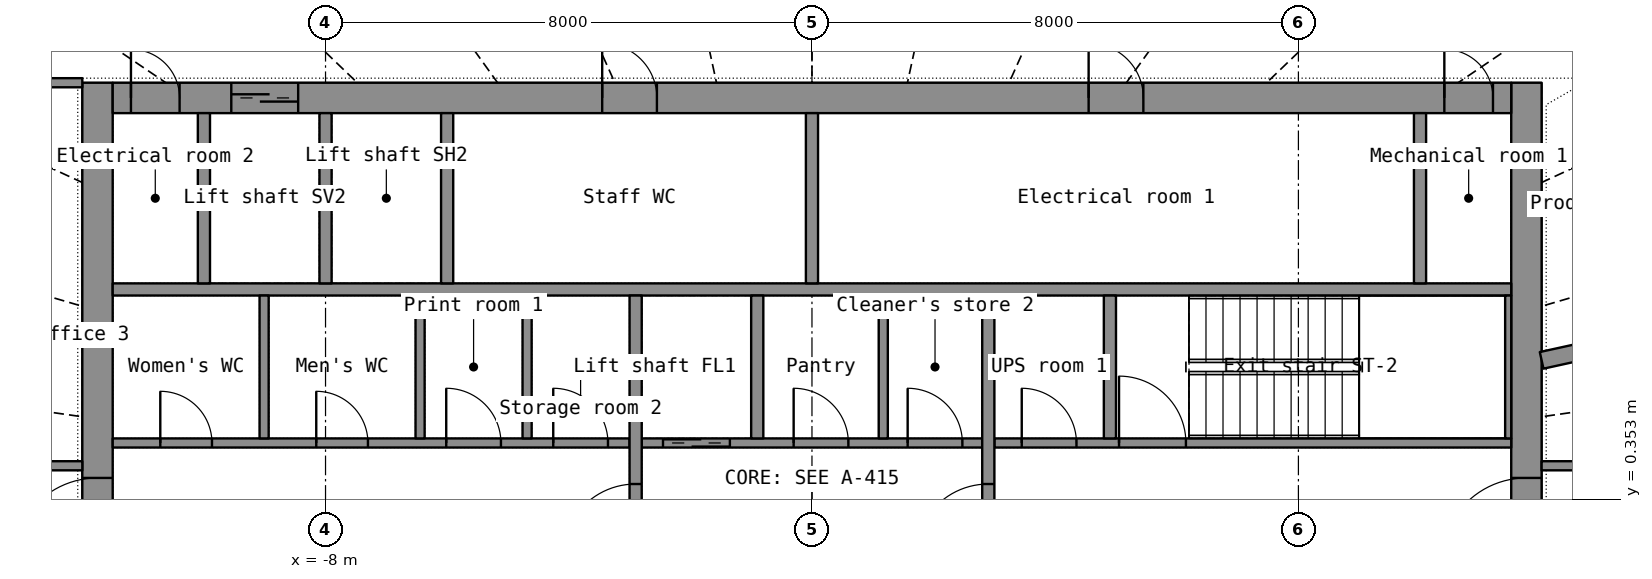
"""IFC4 building model, lengths in metres.
Left out: names, types, materials, properties, quantities, classifications, styles, units other than length and angle.
Written with IfcOpenShell. Run it as: python <this file> out.ifc"""

import sys

from ifc_helpers import new_model, si_unit, direction, frame, frame_2d, origin, place, context, subcontext, project, spatial, rectangle, extrude, element, fill, save


model = new_model("IFC4")
c1 = context("Model", 3, precision=1e-05, world=origin(), true_north=direction((0.0, 1.0)))
c2 = subcontext(c1, "Body", "Model", "MODEL_VIEW")
j1 = project(units=[si_unit("LENGTHUNIT", "METRE"), si_unit("PLANEANGLEUNIT", "RADIAN")], contexts=[c1])
p1 = place(None, origin())
s1 = spatial("IfcSite", under=j1, at=p1, CompositionType="ELEMENT")
p2 = place(p1, origin())
s2 = spatial("IfcBuilding", under=s1, at=p2, CompositionType="ELEMENT")
p3 = place(p2, frame((0.0, 0.0, 104.5)))
s3 = spatial("IfcBuildingStorey", under=s2, at=p3, CompositionType="ELEMENT", Elevation=104.5)
p4 = place(p3, frame((-11.75, -7.2, 0.0), z_axis=(0.0, 0.0, 1.0), x_axis=(0.0, 1.0, 0.0)))
e1 = element("IfcWall", 1, at=p4, inside=s3, PredefinedType="SHEAR", context=c2, shape_type="SweptSolid", body=[
    extrude(rectangle(XDim=14.4, YDim=0.5, at=frame_2d((7.2, 0.0))), origin(), (0.0, 0.0, 1.0), 3.3),
])
p5 = place(p4, frame((6.5, 0.0, 0.0)))
e2 = element("IfcOpeningElement", 2, at=p5, cuts=e1, PredefinedType="OPENING", context=c2, shape_type="SweptSolid", body=[
    extrude(rectangle(XDim=1.4, YDim=2.2, at=frame_2d((0.7, 1.1))), frame((0.0, 0.26, 0.0), z_axis=(0.0, -1.0, 0.0), x_axis=(1.0, 0.0, 0.0)), (0.0, 0.0, 1.0), 0.52),
])
p6 = place(p3, frame((11.75, -7.2, 0.0), z_axis=(0.0, 0.0, 1.0), x_axis=(0.0, 1.0, 0.0)))
e3 = element("IfcWall", 3, at=p6, inside=s3, PredefinedType="SHEAR", context=c2, shape_type="SweptSolid", body=[
    extrude(rectangle(XDim=14.4, YDim=0.5, at=frame_2d((7.2, 0.0))), origin(), (0.0, 0.0, 1.0), 3.3),
])
p7 = place(p6, frame((6.5, 0.0, 0.0)))
e4 = element("IfcOpeningElement", 4, at=p7, cuts=e3, PredefinedType="OPENING", context=c2, shape_type="SweptSolid", body=[
    extrude(rectangle(XDim=1.4, YDim=2.2, at=frame_2d((0.7, 1.1))), frame((0.0, 0.26, 0.0), z_axis=(0.0, -1.0, 0.0), x_axis=(1.0, 0.0, 0.0)), (0.0, 0.0, 1.0), 0.52),
])
p8 = place(p3, frame((-11.5, 6.95, 0.0), z_axis=(0.0, 0.0, 1.0), x_axis=(1.0, 0.0, 0.0)))
e5 = element("IfcWall", 5, at=p8, inside=s3, PredefinedType="SHEAR", context=c2, shape_type="SweptSolid", body=[
    extrude(rectangle(XDim=23.0, YDim=0.5, at=frame_2d((11.5, 0.0))), origin(), (0.0, 0.0, 1.0), 3.3),
])
p9 = place(p8, frame((1.95, 0.0, 0.0)))
e6 = element("IfcOpeningElement", 6, at=p9, cuts=e5, PredefinedType="OPENING", context=c2, shape_type="SweptSolid", body=[
    extrude(rectangle(XDim=1.1, YDim=2.2, at=frame_2d((0.55, 1.1))), frame((0.0, 0.26, 0.0), z_axis=(0.0, -1.0, 0.0), x_axis=(1.0, 0.0, 0.0)), (0.0, 0.0, 1.0), 0.52),
])
p10 = place(p8, frame((8.05, 0.0, 0.0)))
e7 = element("IfcOpeningElement", 7, at=p10, cuts=e5, PredefinedType="OPENING", context=c2, shape_type="SweptSolid", body=[
    extrude(rectangle(XDim=0.9, YDim=2.1, at=frame_2d((0.45, 1.05))), frame((0.0, 0.26, 0.0), z_axis=(0.0, -1.0, 0.0), x_axis=(1.0, 0.0, 0.0)), (0.0, 0.0, 1.0), 0.52),
])
p11 = place(p8, frame((16.05, 0.0, 0.0)))
e8 = element("IfcOpeningElement", 8, at=p11, cuts=e5, PredefinedType="OPENING", context=c2, shape_type="SweptSolid", body=[
    extrude(rectangle(XDim=0.9, YDim=2.1, at=frame_2d((0.45, 1.05))), frame((0.0, 0.26, 0.0), z_axis=(0.0, -1.0, 0.0), x_axis=(1.0, 0.0, 0.0)), (0.0, 0.0, 1.0), 0.52),
])
p12 = place(p8, frame((0.3, 0.0, 0.0)))
e9 = element("IfcOpeningElement", 9, at=p12, cuts=e5, PredefinedType="OPENING", context=c2, shape_type="SweptSolid", body=[
    extrude(rectangle(XDim=0.8, YDim=2.05, at=frame_2d((0.4, 1.025))), frame((0.0, 0.26, 0.0), z_axis=(0.0, -1.0, 0.0), x_axis=(1.0, 0.0, 0.0)), (0.0, 0.0, 1.0), 0.52),
])
p13 = place(p8, frame((21.9, 0.0, 0.0)))
e10 = element("IfcOpeningElement", 10, at=p13, cuts=e5, PredefinedType="OPENING", context=c2, shape_type="SweptSolid", body=[
    extrude(rectangle(XDim=0.8, YDim=2.05, at=frame_2d((0.4, 1.025))), frame((0.0, 0.26, 0.0), z_axis=(0.0, -1.0, 0.0), x_axis=(1.0, 0.0, 0.0)), (0.0, 0.0, 1.0), 0.52),
])
p14 = place(p3, frame((-11.5, 3.8, 0.0), z_axis=(0.0, 0.0, 1.0), x_axis=(1.0, 0.0, 0.0)))
e11 = element("IfcWall", 11, at=p14, inside=s3, PredefinedType="SHEAR", context=c2, shape_type="SweptSolid", body=[
    extrude(rectangle(XDim=23.0, YDim=0.2, at=frame_2d((11.5, 0.0))), origin(), (0.0, 0.0, 1.0), 3.3),
])
for number, where, z_axis, x_axis in (
    (12, (-10.0, 3.9, 0.0), (0.0, 0.0, 1.0), (0.0, 1.0, 0.0)),
    (13, (-8.0, 3.9, 0.0), (0.0, 0.0, 1.0), (0.0, 1.0, 0.0)),
    (14, (-6.0, 3.9, 0.0), (0.0, 0.0, 1.0), (0.0, 1.0, 0.0)),
    (15, (10.0, 3.9, 0.0), (0.0, 0.0, 1.0), (0.0, 1.0, 0.0)),
):
    element("IfcWall", number, at=place(p3, frame(where, z_axis=z_axis, x_axis=x_axis)), inside=s3, PredefinedType="SHEAR", context=c2, shape_type="SweptSolid", body=[
        extrude(rectangle(XDim=2.8, YDim=0.2, at=frame_2d((1.4, 0.0))), origin(), (0.0, 0.0, 1.0), 3.3),
    ])
p15 = place(p3, frame((0.0, 3.9, 0.0), z_axis=(0.0, 0.0, 1.0), x_axis=(0.0, 1.0, 0.0)))
e16 = element("IfcWall", 16, at=p15, inside=s3, PredefinedType="PARTITIONING", context=c2, shape_type="SweptSolid", body=[
    extrude(rectangle(XDim=2.8, YDim=0.2, at=frame_2d((1.4, 0.0))), origin(), (0.0, 0.0, 1.0), 3.3),
])
p16 = place(p3, frame((-11.5, 1.275, 0.0), z_axis=(0.0, 0.0, 1.0), x_axis=(1.0, 0.0, 0.0)))
e17 = element("IfcWall", 17, at=p16, inside=s3, PredefinedType="PARTITIONING", context=c2, shape_type="SweptSolid", body=[
    extrude(rectangle(XDim=8.5, YDim=0.15, at=frame_2d((4.25, 0.0))), origin(), (0.0, 0.0, 1.0), 3.3),
])
p17 = place(p16, frame((0.782, 0.0, 0.0)))
e18 = element("IfcOpeningElement", 18, at=p17, cuts=e17, PredefinedType="OPENING", context=c2, shape_type="SweptSolid", body=[
    extrude(rectangle(XDim=0.85, YDim=2.1, at=frame_2d((0.425, 1.05))), frame((0.0, 0.085, 0.0), z_axis=(0.0, -1.0, 0.0), x_axis=(1.0, 0.0, 0.0)), (0.0, 0.0, 1.0), 0.17),
])
p18 = place(p16, frame((3.347, 0.0, 0.0)))
e19 = element("IfcOpeningElement", 19, at=p18, cuts=e17, PredefinedType="OPENING", context=c2, shape_type="SweptSolid", body=[
    extrude(rectangle(XDim=0.85, YDim=2.1, at=frame_2d((0.425, 1.05))), frame((0.0, 0.085, 0.0), z_axis=(0.0, -1.0, 0.0), x_axis=(1.0, 0.0, 0.0)), (0.0, 0.0, 1.0), 0.17),
])
p19 = place(p16, frame((5.485, 0.0, 0.0)))
e20 = element("IfcOpeningElement", 20, at=p19, cuts=e17, PredefinedType="OPENING", context=c2, shape_type="SweptSolid", body=[
    extrude(rectangle(XDim=0.9, YDim=2.1, at=frame_2d((0.45, 1.05))), frame((0.0, 0.085, 0.0), z_axis=(0.0, -1.0, 0.0), x_axis=(1.0, 0.0, 0.0)), (0.0, 0.0, 1.0), 0.17),
])
p20 = place(p16, frame((7.245, 0.0, 0.0)))
e21 = element("IfcOpeningElement", 21, at=p20, cuts=e17, PredefinedType="OPENING", context=c2, shape_type="SweptSolid", body=[
    extrude(rectangle(XDim=0.9, YDim=2.1, at=frame_2d((0.45, 1.05))), frame((0.0, 0.085, 0.0), z_axis=(0.0, -1.0, 0.0), x_axis=(1.0, 0.0, 0.0)), (0.0, 0.0, 1.0), 0.17),
])
p21 = place(p3, frame((-2.8, 1.275, 0.0), z_axis=(0.0, 0.0, 1.0), x_axis=(1.0, 0.0, 0.0)))
e22 = element("IfcWall", 22, at=p21, inside=s3, PredefinedType="SHEAR", context=c2, shape_type="SweptSolid", body=[
    extrude(rectangle(XDim=5.6, YDim=0.15, at=frame_2d((2.8, 0.0))), origin(), (0.0, 0.0, 1.0), 3.3),
])
p22 = place(p21, frame((0.35, 0.0, 0.0)))
e23 = element("IfcOpeningElement", 23, at=p22, cuts=e22, PredefinedType="OPENING", context=c2, shape_type="SweptSolid", body=[
    extrude(rectangle(XDim=1.1, YDim=2.2, at=frame_2d((0.55, 1.1))), frame((0.0, 0.085, 0.0), z_axis=(0.0, -1.0, 0.0), x_axis=(1.0, 0.0, 0.0)), (0.0, 0.0, 1.0), 0.17),
])
p23 = place(p21, frame((2.499, 0.0, 0.0)))
e24 = element("IfcOpeningElement", 24, at=p23, cuts=e22, PredefinedType="OPENING", context=c2, shape_type="SweptSolid", body=[
    extrude(rectangle(XDim=0.9, YDim=2.1, at=frame_2d((0.45, 1.05))), frame((0.0, 0.085, 0.0), z_axis=(0.0, -1.0, 0.0), x_axis=(1.0, 0.0, 0.0)), (0.0, 0.0, 1.0), 0.17),
])
p24 = place(p21, frame((4.374, 0.0, 0.0)))
e25 = element("IfcOpeningElement", 25, at=p24, cuts=e22, PredefinedType="OPENING", context=c2, shape_type="SweptSolid", body=[
    extrude(rectangle(XDim=0.9, YDim=2.1, at=frame_2d((0.45, 1.05))), frame((0.0, 0.085, 0.0), z_axis=(0.0, -1.0, 0.0), x_axis=(1.0, 0.0, 0.0)), (0.0, 0.0, 1.0), 0.17),
])
p25 = place(p3, frame((3.0, 1.275, 0.0), z_axis=(0.0, 0.0, 1.0), x_axis=(1.0, 0.0, 0.0)))
e26 = element("IfcWall", 26, at=p25, inside=s3, PredefinedType="SHEAR", context=c2, shape_type="SweptSolid", body=[
    extrude(rectangle(XDim=8.5, YDim=0.15, at=frame_2d((4.25, 0.0))), origin(), (0.0, 0.0, 1.0), 3.3),
])
p26 = place(p25, frame((2.05, 0.0, 0.0)))
e27 = element("IfcOpeningElement", 27, at=p26, cuts=e26, PredefinedType="OPENING", context=c2, shape_type="SweptSolid", body=[
    extrude(rectangle(XDim=1.1, YDim=2.15, at=frame_2d((0.55, 1.075))), frame((0.0, 0.085, 0.0), z_axis=(0.0, -1.0, 0.0), x_axis=(1.0, 0.0, 0.0)), (0.0, 0.0, 1.0), 0.17),
])
p27 = place(p25, frame((0.45, 0.0, 0.0)))
e28 = element("IfcOpeningElement", 28, at=p27, cuts=e26, PredefinedType="OPENING", context=c2, shape_type="SweptSolid", body=[
    extrude(rectangle(XDim=0.9, YDim=2.1, at=frame_2d((0.45, 1.05))), frame((0.0, 0.085, 0.0), z_axis=(0.0, -1.0, 0.0), x_axis=(1.0, 0.0, 0.0)), (0.0, 0.0, 1.0), 0.17),
])
p28 = place(p3, frame((-2.9, -3.7, 0.0), z_axis=(0.0, 0.0, 1.0), x_axis=(0.0, 1.0, 0.0)))
e29 = element("IfcWall", 29, at=p28, inside=s3, PredefinedType="SHEAR", context=c2, shape_type="SweptSolid", body=[
    extrude(rectangle(XDim=7.4, YDim=0.2, at=frame_2d((3.7, 0.0))), origin(), (0.0, 0.0, 1.0), 3.3),
])
p29 = place(p28, frame((3.1, 0.0, 0.0)))
e30 = element("IfcOpeningElement", 30, at=p29, cuts=e29, PredefinedType="OPENING", context=c2, shape_type="SweptSolid", body=[
    extrude(rectangle(XDim=1.2, YDim=2.2, at=frame_2d((0.6, 1.1))), frame((0.0, 0.11, 0.0), z_axis=(0.0, -1.0, 0.0), x_axis=(1.0, 0.0, 0.0)), (0.0, 0.0, 1.0), 0.22),
])
p30 = place(p3, frame((2.9, -3.7, 0.0), z_axis=(0.0, 0.0, 1.0), x_axis=(0.0, 1.0, 0.0)))
e31 = element("IfcWall", 31, at=p30, inside=s3, PredefinedType="SHEAR", context=c2, shape_type="SweptSolid", body=[
    extrude(rectangle(XDim=7.4, YDim=0.2, at=frame_2d((3.7, 0.0))), origin(), (0.0, 0.0, 1.0), 3.3),
])
p31 = place(p30, frame((3.1, 0.0, 0.0)))
e32 = element("IfcOpeningElement", 32, at=p31, cuts=e31, PredefinedType="OPENING", context=c2, shape_type="SweptSolid", body=[
    extrude(rectangle(XDim=1.2, YDim=2.2, at=frame_2d((0.6, 1.1))), frame((0.0, 0.11, 0.0), z_axis=(0.0, -1.0, 0.0), x_axis=(1.0, 0.0, 0.0)), (0.0, 0.0, 1.0), 0.22),
])
p32 = place(p3, frame((-0.9, 1.35, 0.0), z_axis=(0.0, 0.0, 1.0), x_axis=(0.0, 1.0, 0.0)))
e33 = element("IfcWall", 33, at=p32, inside=s3, PredefinedType="SHEAR", context=c2, shape_type="SweptSolid", body=[
    extrude(rectangle(XDim=2.35, YDim=0.2, at=frame_2d((1.175, 0.0))), origin(), (0.0, 0.0, 1.0), 3.3),
])
p33 = place(p3, frame((11.45, 1.35, 0.0), z_axis=(0.0, 0.0, 1.0), x_axis=(0.0, 1.0, 0.0)))
e34 = element("IfcWall", 34, at=p33, inside=s3, PredefinedType="SHEAR", context=c2, shape_type="SweptSolid", body=[
    extrude(rectangle(XDim=2.35, YDim=0.1, at=frame_2d((1.175, 0.0))), origin(), (0.0, 0.0, 1.0), 3.3),
])
p34 = place(p3, frame((4.9, 1.35, 0.0), z_axis=(0.0, 0.0, 1.0), x_axis=(0.0, 1.0, 0.0)))
e35 = element("IfcWall", 35, at=p34, inside=s3, PredefinedType="SHEAR", context=c2, shape_type="SweptSolid", body=[
    extrude(rectangle(XDim=2.35, YDim=0.2, at=frame_2d((1.175, 0.0))), origin(), (0.0, 0.0, 1.0), 3.3),
])
for number, where, z_axis, x_axis in (
    (36, (-9.01, 1.35, 0.0), (0.0, 0.0, 1.0), (0.0, 1.0, 0.0)),
    (37, (-6.445, 1.35, 0.0), (0.0, 0.0, 1.0), (0.0, 1.0, 0.0)),
    (38, (-4.685, 1.35, 0.0), (0.0, 0.0, 1.0), (0.0, 1.0, 0.0)),
    (39, (1.173, 1.35, 0.0), (0.0, 0.0, 1.0), (0.0, 1.0, 0.0)),
):
    element("IfcWall", number, at=place(p3, frame(where, z_axis=z_axis, x_axis=x_axis)), inside=s3, PredefinedType="PARTITIONING", context=c2, shape_type="SweptSolid", body=[
        extrude(rectangle(XDim=2.35, YDim=0.15, at=frame_2d((1.175, 0.0))), origin(), (0.0, 0.0, 1.0), 3.3),
    ])
p35 = place(p3, frame((16.0, 3.512, 0.0), z_axis=(0.0, 0.0, 1.0), x_axis=(-0.976750433, -0.214379551, 0.0)))
e40 = element("IfcWall", 40, at=p35, inside=s3, PredefinedType="PARTITIONING", context=c2, shape_type="SweptSolid", body=[
    extrude(rectangle(XDim=4.095, YDim=0.28, at=frame_2d((2.048, 0.0))), origin(), (0.0, 0.0, 1.0), 2.4),
])
p36 = place(p35, frame((1.298, 0.0, 1.0)))
e41 = element("IfcOpeningElement", 41, at=p36, cuts=e40, PredefinedType="OPENING", context=c2, shape_type="SweptSolid", body=[
    extrude(rectangle(XDim=1.5, YDim=1.2, at=frame_2d((0.75, 0.6))), frame((0.0, 0.15, 0.0), z_axis=(0.0, -1.0, 0.0), x_axis=(1.0, 0.0, 0.0)), (0.0, 0.0, 1.0), 0.3),
])
for number, where, z_axis, x_axis in (
    (42, (-15.923, 7.2, 0.0), (0.0, 0.0, 1.0), (1.0, 0.0, 0.0)),
    (43, (-12.0, 0.9, 0.0), (0.0, 0.0, 1.0), (-1.0, 0.0, 0.0)),
):
    element("IfcWall", number, at=place(p3, frame(where, z_axis=z_axis, x_axis=x_axis)), inside=s3, PredefinedType="PARTITIONING", context=c2, shape_type="SweptSolid", body=[
        extrude(rectangle(XDim=3.923, YDim=0.15, at=frame_2d((1.961, 0.0))), origin(), (0.0, 0.0, 1.0), 2.4),
    ])
p37 = place(p3, frame((16.0, 0.9, 0.0), z_axis=(0.0, 0.0, 1.0), x_axis=(-1.0, 0.0, 0.0)))
e44 = element("IfcWall", 44, at=p37, inside=s3, PredefinedType="PARTITIONING", context=c2, shape_type="SweptSolid", body=[
    extrude(rectangle(XDim=4.0, YDim=0.15, at=frame_2d((2.0, 0.0))), origin(), (0.0, 0.0, 1.0), 2.4),
])
p38 = place(p37, frame((1.5, 0.0, 0.0)))
e45 = element("IfcOpeningElement", 45, at=p38, cuts=e44, PredefinedType="OPENING", context=c2, shape_type="SweptSolid", body=[
    extrude(rectangle(XDim=1.0, YDim=2.2, at=frame_2d((0.5, 1.1))), frame((0.0, 0.085, 0.0), z_axis=(0.0, -1.0, 0.0), x_axis=(1.0, 0.0, 0.0)), (0.0, 0.0, 1.0), 0.17),
])
p39 = place(p9, origin())
e46 = element("IfcDoor", 46, at=p39, inside=s3, OperationType="DOUBLE_DOOR_SLIDING", PredefinedType="DOOR", context=c2, shape_type="SweptSolid", body=[
    extrude(rectangle(XDim=1.1, YDim=2.2, at=frame_2d((0.55, 1.1))), frame((0.0, 0.025, 0.0), z_axis=(0.0, -1.0, 0.0), x_axis=(1.0, 0.0, 0.0)), (0.0, 0.0, 1.0), 0.05),
])
fill(e6, e46)
p40 = place(p10, origin())
e47 = element("IfcDoor", 47, at=p40, inside=s3, OperationType="SINGLE_SWING_LEFT", PredefinedType="DOOR", context=c2, shape_type="SweptSolid", body=[
    extrude(rectangle(XDim=0.9, YDim=2.1, at=frame_2d((0.45, 1.05))), frame((0.0, 0.025, 0.0), z_axis=(0.0, -1.0, 0.0), x_axis=(1.0, 0.0, 0.0)), (0.0, 0.0, 1.0), 0.05),
])
fill(e7, e47)
p41 = place(p11, origin())
e48 = element("IfcDoor", 48, at=p41, inside=s3, OperationType="SINGLE_SWING_LEFT", PredefinedType="DOOR", context=c2, shape_type="SweptSolid", body=[
    extrude(rectangle(XDim=0.9, YDim=2.1, at=frame_2d((0.45, 1.05))), frame((0.0, 0.025, 0.0), z_axis=(0.0, -1.0, 0.0), x_axis=(1.0, 0.0, 0.0)), (0.0, 0.0, 1.0), 0.05),
])
fill(e8, e48)
p42 = place(p12, origin())
e49 = element("IfcDoor", 49, at=p42, inside=s3, OperationType="SINGLE_SWING_LEFT", PredefinedType="DOOR", context=c2, shape_type="SweptSolid", body=[
    extrude(rectangle(XDim=0.8, YDim=2.05, at=frame_2d((0.4, 1.025))), frame((0.0, 0.025, 0.0), z_axis=(0.0, -1.0, 0.0), x_axis=(1.0, 0.0, 0.0)), (0.0, 0.0, 1.0), 0.05),
])
fill(e9, e49)
p43 = place(p13, origin())
e50 = element("IfcDoor", 50, at=p43, inside=s3, OperationType="SINGLE_SWING_LEFT", PredefinedType="DOOR", context=c2, shape_type="SweptSolid", body=[
    extrude(rectangle(XDim=0.8, YDim=2.05, at=frame_2d((0.4, 1.025))), frame((0.0, 0.025, 0.0), z_axis=(0.0, -1.0, 0.0), x_axis=(1.0, 0.0, 0.0)), (0.0, 0.0, 1.0), 0.05),
])
fill(e10, e50)
p44 = place(p5, origin())
e51 = element("IfcDoor", 51, at=p44, inside=s3, OperationType="DOUBLE_DOOR_SINGLE_SWING", PredefinedType="DOOR", context=c2, shape_type="SweptSolid", body=[
    extrude(rectangle(XDim=1.4, YDim=2.2, at=frame_2d((0.7, 1.1))), frame((0.0, 0.025, 0.0), z_axis=(0.0, -1.0, 0.0), x_axis=(1.0, 0.0, 0.0)), (0.0, 0.0, 1.0), 0.05),
])
fill(e2, e51)
p45 = place(p7, origin())
e52 = element("IfcDoor", 52, at=p45, inside=s3, OperationType="DOUBLE_DOOR_SINGLE_SWING", PredefinedType="DOOR", context=c2, shape_type="SweptSolid", body=[
    extrude(rectangle(XDim=1.4, YDim=2.2, at=frame_2d((0.7, 1.1))), frame((0.0, 0.025, 0.0), z_axis=(0.0, -1.0, 0.0), x_axis=(1.0, 0.0, 0.0)), (0.0, 0.0, 1.0), 0.05),
])
fill(e4, e52)
p46 = place(p29, origin())
e53 = element("IfcDoor", 53, at=p46, inside=s3, OperationType="SINGLE_SWING_LEFT", PredefinedType="DOOR", context=c2, shape_type="SweptSolid", body=[
    extrude(rectangle(XDim=1.2, YDim=2.2, at=frame_2d((0.6, 1.1))), frame((0.0, 0.025, 0.0), z_axis=(0.0, -1.0, 0.0), x_axis=(1.0, 0.0, 0.0)), (0.0, 0.0, 1.0), 0.05),
])
fill(e30, e53)
p47 = place(p31, origin())
e54 = element("IfcDoor", 54, at=p47, inside=s3, OperationType="SINGLE_SWING_LEFT", PredefinedType="DOOR", context=c2, shape_type="SweptSolid", body=[
    extrude(rectangle(XDim=1.2, YDim=2.2, at=frame_2d((0.6, 1.1))), frame((0.0, 0.025, 0.0), z_axis=(0.0, -1.0, 0.0), x_axis=(1.0, 0.0, 0.0)), (0.0, 0.0, 1.0), 0.05),
])
fill(e32, e54)
p48 = place(p22, origin())
e55 = element("IfcDoor", 55, at=p48, inside=s3, OperationType="DOUBLE_DOOR_SLIDING", PredefinedType="DOOR", context=c2, shape_type="SweptSolid", body=[
    extrude(rectangle(XDim=1.1, YDim=2.2, at=frame_2d((0.55, 1.1))), frame((0.0, 0.025, 0.0), z_axis=(0.0, -1.0, 0.0), x_axis=(1.0, 0.0, 0.0)), (0.0, 0.0, 1.0), 0.05),
])
fill(e23, e55)
p49 = place(p26, origin())
e56 = element("IfcDoor", 56, at=p49, inside=s3, OperationType="SINGLE_SWING_LEFT", PredefinedType="DOOR", context=c2, shape_type="SweptSolid", body=[
    extrude(rectangle(XDim=1.1, YDim=2.15, at=frame_2d((0.55, 1.075))), frame((0.0, 0.025, 0.0), z_axis=(0.0, -1.0, 0.0), x_axis=(1.0, 0.0, 0.0)), (0.0, 0.0, 1.0), 0.05),
])
fill(e27, e56)
p50 = place(p17, origin())
e57 = element("IfcDoor", 57, at=p50, inside=s3, OperationType="SINGLE_SWING_LEFT", PredefinedType="DOOR", context=c2, shape_type="SweptSolid", body=[
    extrude(rectangle(XDim=0.85, YDim=2.1, at=frame_2d((0.425, 1.05))), frame((0.0, 0.025, 0.0), z_axis=(0.0, -1.0, 0.0), x_axis=(1.0, 0.0, 0.0)), (0.0, 0.0, 1.0), 0.05),
])
fill(e18, e57)
p51 = place(p18, origin())
e58 = element("IfcDoor", 58, at=p51, inside=s3, OperationType="SINGLE_SWING_LEFT", PredefinedType="DOOR", context=c2, shape_type="SweptSolid", body=[
    extrude(rectangle(XDim=0.85, YDim=2.1, at=frame_2d((0.425, 1.05))), frame((0.0, 0.025, 0.0), z_axis=(0.0, -1.0, 0.0), x_axis=(1.0, 0.0, 0.0)), (0.0, 0.0, 1.0), 0.05),
])
fill(e19, e58)
p52 = place(p19, origin())
e59 = element("IfcDoor", 59, at=p52, inside=s3, OperationType="SINGLE_SWING_LEFT", PredefinedType="DOOR", context=c2, shape_type="SweptSolid", body=[
    extrude(rectangle(XDim=0.9, YDim=2.1, at=frame_2d((0.45, 1.05))), frame((0.0, 0.025, 0.0), z_axis=(0.0, -1.0, 0.0), x_axis=(1.0, 0.0, 0.0)), (0.0, 0.0, 1.0), 0.05),
])
fill(e20, e59)
p53 = place(p20, origin())
e60 = element("IfcDoor", 60, at=p53, inside=s3, OperationType="SINGLE_SWING_LEFT", PredefinedType="DOOR", context=c2, shape_type="SweptSolid", body=[
    extrude(rectangle(XDim=0.9, YDim=2.1, at=frame_2d((0.45, 1.05))), frame((0.0, 0.025, 0.0), z_axis=(0.0, -1.0, 0.0), x_axis=(1.0, 0.0, 0.0)), (0.0, 0.0, 1.0), 0.05),
])
fill(e21, e60)
p54 = place(p23, origin())
e61 = element("IfcDoor", 61, at=p54, inside=s3, OperationType="SINGLE_SWING_LEFT", PredefinedType="DOOR", context=c2, shape_type="SweptSolid", body=[
    extrude(rectangle(XDim=0.9, YDim=2.1, at=frame_2d((0.45, 1.05))), frame((0.0, 0.025, 0.0), z_axis=(0.0, -1.0, 0.0), x_axis=(1.0, 0.0, 0.0)), (0.0, 0.0, 1.0), 0.05),
])
fill(e24, e61)
p55 = place(p24, origin())
e62 = element("IfcDoor", 62, at=p55, inside=s3, OperationType="SINGLE_SWING_LEFT", PredefinedType="DOOR", context=c2, shape_type="SweptSolid", body=[
    extrude(rectangle(XDim=0.9, YDim=2.1, at=frame_2d((0.45, 1.05))), frame((0.0, 0.025, 0.0), z_axis=(0.0, -1.0, 0.0), x_axis=(1.0, 0.0, 0.0)), (0.0, 0.0, 1.0), 0.05),
])
fill(e25, e62)
p56 = place(p27, origin())
e63 = element("IfcDoor", 63, at=p56, inside=s3, OperationType="SINGLE_SWING_LEFT", PredefinedType="DOOR", context=c2, shape_type="SweptSolid", body=[
    extrude(rectangle(XDim=0.9, YDim=2.1, at=frame_2d((0.45, 1.05))), frame((0.0, 0.025, 0.0), z_axis=(0.0, -1.0, 0.0), x_axis=(1.0, 0.0, 0.0)), (0.0, 0.0, 1.0), 0.05),
])
fill(e28, e63)
save(model, sys.argv[1])
